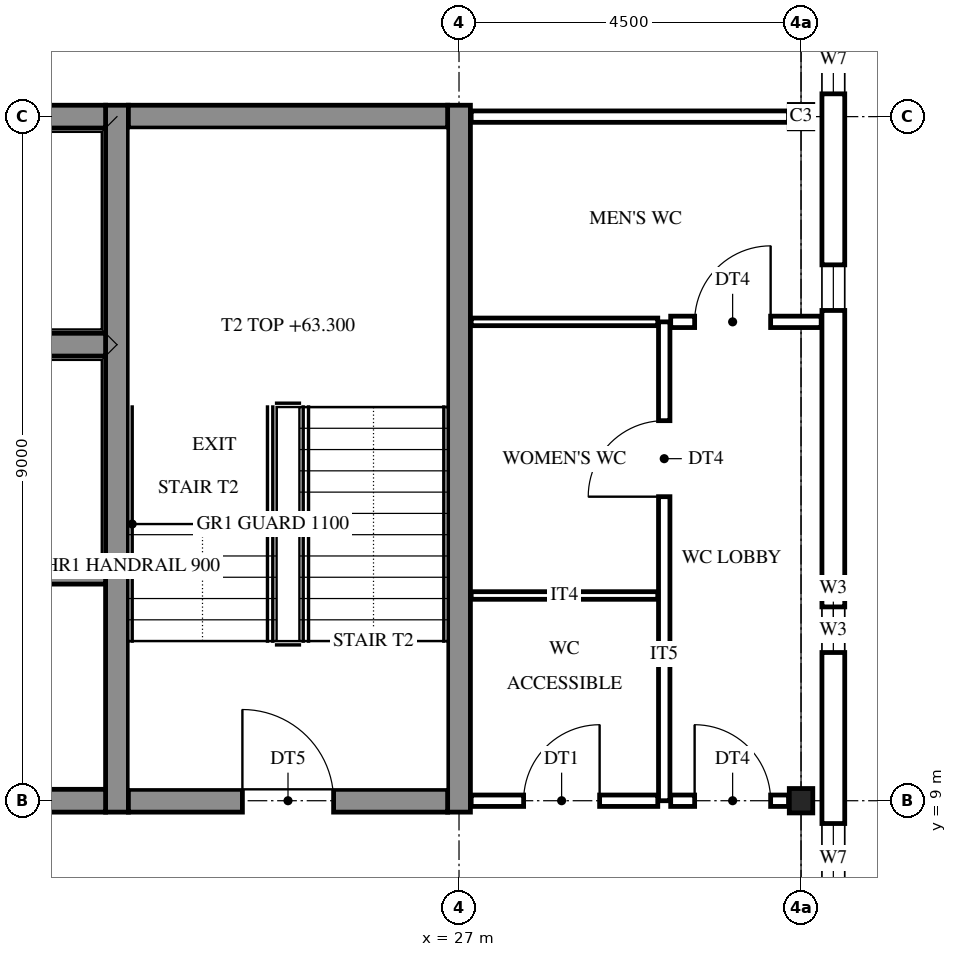
"""IFC4 building model, lengths in metres.
Left out: names, types, materials, properties, quantities, classifications, styles, units other than length and angle.
Written with IfcOpenShell. Run it as: python <this file> out.ifc"""

import sys

from ifc_helpers import new_model, si_unit, direction, frame, frame_2d, origin, origin_2d, place, context, subcontext, project, spatial, rectangle, i_section, extrude, element, fill, save


model = new_model("IFC4")
c1 = context("Model", 3, precision=1e-05, world=origin(), true_north=direction((0.0, 1.0)))
c2 = subcontext(c1, "Body", "Model", "MODEL_VIEW")
j1 = project(units=[si_unit("LENGTHUNIT", "METRE"), si_unit("PLANEANGLEUNIT", "RADIAN")], contexts=[c1])
p1 = place(None, origin())
s1 = spatial("IfcSite", under=j1, at=p1, CompositionType="ELEMENT")
p2 = place(p1, origin())
s2 = spatial("IfcBuilding", under=s1, at=p2, CompositionType="ELEMENT")
p3 = place(p2, frame((0.0, 0.0, 61.2)))
s3 = spatial("IfcBuildingStorey", under=s2, at=p3, CompositionType="ELEMENT", Elevation=61.2)
for number, where, z_axis, x_axis in (
    (1, (31.5, 9.0, 0.0), (0.0, 0.0, 1.0), (1.0, 0.0, 0.0)),
    (2, (31.5, 18.0, 0.0), (0.0, 0.0, 1.0), (1.0, 0.0, 0.0)),
):
    element("IfcColumn", number, at=place(p3, frame(where, z_axis=z_axis, x_axis=x_axis)), inside=s3, PredefinedType="COLUMN", context=c2, shape_type="SweptSolid", body=[
        extrude(i_section(OverallWidth=0.309, OverallDepth=0.321, WebThickness=0.014, FlangeThickness=0.022, FilletRadius=0.017, at=origin_2d()), origin(), (0.0, 0.0, 1.0), 4.2),
    ])
for number, where, z_axis, x_axis in (
    (3, (22.5, 8.85, 0.0), (0.0, 0.0, 1.0), (0.0, 1.0, 0.0)),
    (4, (27.0, 8.85, 0.0), (0.0, 0.0, 1.0), (0.0, 1.0, 0.0)),
):
    element("IfcWall", number, at=place(p3, frame(where, z_axis=z_axis, x_axis=x_axis)), inside=s3, PredefinedType="SHEAR", context=c2, shape_type="SweptSolid", body=[
        extrude(rectangle(XDim=9.3, YDim=0.3, at=frame_2d((4.65, 0.0))), origin(), (0.0, 0.0, 1.0), 4.2),
    ])
p4 = place(p3, frame((19.65, 9.0, 0.0), z_axis=(0.0, 0.0, 1.0), x_axis=(1.0, 0.0, 0.0)))
e5 = element("IfcWall", 5, at=p4, inside=s3, PredefinedType="SHEAR", context=c2, shape_type="SweptSolid", body=[
    extrude(rectangle(XDim=2.7, YDim=0.3, at=frame_2d((1.35, 0.0))), origin(), (0.0, 0.0, 1.0), 4.2),
])
p5 = place(p3, frame((22.65, 9.0, 0.0), z_axis=(0.0, 0.0, 1.0), x_axis=(1.0, 0.0, 0.0)))
e6 = element("IfcWall", 6, at=p5, inside=s3, PredefinedType="SHEAR", context=c2, shape_type="SweptSolid", body=[
    extrude(rectangle(XDim=4.2, YDim=0.3, at=frame_2d((2.1, 0.0))), origin(), (0.0, 0.0, 1.0), 4.2),
])
p6 = place(p5, frame((1.5, 0.0, 0.0)))
e7 = element("IfcOpeningElement", 7, at=p6, cuts=e6, PredefinedType="OPENING", context=c2, shape_type="SweptSolid", body=[
    extrude(rectangle(XDim=1.2, YDim=2.1, at=frame_2d((0.6, 1.05))), frame((0.0, 0.16, 0.0), z_axis=(0.0, -1.0, 0.0), x_axis=(1.0, 0.0, 0.0)), (0.0, 0.0, 1.0), 0.32),
])
for number, where, z_axis, x_axis in (
    (8, (19.65, 12.0, 0.0), (0.0, 0.0, 1.0), (1.0, 0.0, 0.0)),
    (9, (19.65, 15.0, 0.0), (0.0, 0.0, 1.0), (1.0, 0.0, 0.0)),
    (10, (19.65, 18.0, 0.0), (0.0, 0.0, 1.0), (1.0, 0.0, 0.0)),
):
    element("IfcWall", number, at=place(p3, frame(where, z_axis=z_axis, x_axis=x_axis)), inside=s3, PredefinedType="SHEAR", context=c2, shape_type="SweptSolid", body=[
        extrude(rectangle(XDim=2.7, YDim=0.3, at=frame_2d((1.35, 0.0))), origin(), (0.0, 0.0, 1.0), 4.2),
    ])
p7 = place(p3, frame((22.65, 18.0, 0.0), z_axis=(0.0, 0.0, 1.0), x_axis=(1.0, 0.0, 0.0)))
e11 = element("IfcWall", 11, at=p7, inside=s3, PredefinedType="SHEAR", context=c2, shape_type="SweptSolid", body=[
    extrude(rectangle(XDim=4.2, YDim=0.3, at=frame_2d((2.1, 0.0))), origin(), (0.0, 0.0, 1.0), 4.2),
])
p8 = place(p3, frame((31.925, 27.275, 0.0), z_axis=(0.0, 0.0, 1.0), x_axis=(0.0, -1.0, 0.0)))
e12 = element("IfcWall", 12, at=p8, inside=s3, PredefinedType="STANDARD", context=c2, shape_type="SweptSolid", body=[
    extrude(rectangle(XDim=27.55, YDim=0.3, at=frame_2d((13.775, 0.0))), origin(), (0.0, 0.0, 1.0), 4.2),
])
p9 = place(p8, frame((26.075, 0.0, 0.6)))
e13 = element("IfcOpeningElement", 13, at=p9, cuts=e12, PredefinedType="OPENING", context=c2, shape_type="SweptSolid", body=[
    extrude(rectangle(XDim=0.9, YDim=2.3, at=frame_2d((0.45, 1.15))), frame((0.0, 0.16, 0.0), z_axis=(0.0, -1.0, 0.0), x_axis=(1.0, 0.0, 0.0)), (0.0, 0.0, 1.0), 0.32),
])
p10 = place(p8, frame((18.575, 0.0, 0.6)))
e14 = element("IfcOpeningElement", 14, at=p10, cuts=e12, PredefinedType="OPENING", context=c2, shape_type="SweptSolid", body=[
    extrude(rectangle(XDim=0.9, YDim=2.3, at=frame_2d((0.45, 1.15))), frame((0.0, 0.16, 0.0), z_axis=(0.0, -1.0, 0.0), x_axis=(1.0, 0.0, 0.0)), (0.0, 0.0, 1.0), 0.32),
])
p11 = place(p8, frame((15.725, 0.0, 1.6)))
e15 = element("IfcOpeningElement", 15, at=p11, cuts=e12, PredefinedType="OPENING", context=c2, shape_type="SweptSolid", body=[
    extrude(rectangle(XDim=0.6, YDim=0.9, at=frame_2d((0.3, 0.45))), frame((0.0, 0.16, 0.0), z_axis=(0.0, -1.0, 0.0), x_axis=(1.0, 0.0, 0.0)), (0.0, 0.0, 1.0), 0.32),
])
p12 = place(p8, frame((11.225, 0.0, 1.6)))
e16 = element("IfcOpeningElement", 16, at=p12, cuts=e12, PredefinedType="OPENING", context=c2, shape_type="SweptSolid", body=[
    extrude(rectangle(XDim=0.6, YDim=0.9, at=frame_2d((0.3, 0.45))), frame((0.0, 0.16, 0.0), z_axis=(0.0, -1.0, 0.0), x_axis=(1.0, 0.0, 0.0)), (0.0, 0.0, 1.0), 0.32),
])
p13 = place(p8, frame((8.075, 0.0, 0.6)))
e17 = element("IfcOpeningElement", 17, at=p13, cuts=e12, PredefinedType="OPENING", context=c2, shape_type="SweptSolid", body=[
    extrude(rectangle(XDim=0.9, YDim=2.3, at=frame_2d((0.45, 1.15))), frame((0.0, 0.16, 0.0), z_axis=(0.0, -1.0, 0.0), x_axis=(1.0, 0.0, 0.0)), (0.0, 0.0, 1.0), 0.32),
])
p14 = place(p8, frame((0.575, 0.0, 0.6)))
e18 = element("IfcOpeningElement", 18, at=p14, cuts=e12, PredefinedType="OPENING", context=c2, shape_type="SweptSolid", body=[
    extrude(rectangle(XDim=0.9, YDim=2.3, at=frame_2d((0.45, 1.15))), frame((0.0, 0.16, 0.0), z_axis=(0.0, -1.0, 0.0), x_axis=(1.0, 0.0, 0.0)), (0.0, 0.0, 1.0), 0.32),
])
p15 = place(p3, frame((29.7, 9.0, 0.0), z_axis=(0.0, 0.0, 1.0), x_axis=(0.0, 1.0, 0.0)))
e19 = element("IfcWall", 19, at=p15, inside=s3, PredefinedType="PARTITIONING", context=c2, shape_type="SweptSolid", body=[
    extrude(rectangle(XDim=6.3, YDim=0.15, at=frame_2d((3.15, 0.0))), origin(), (0.0, 0.0, 1.0), 3.537),
])
p16 = place(p15, frame((4.0, 0.0, 0.0)))
e20 = element("IfcOpeningElement", 20, at=p16, cuts=e19, PredefinedType="OPENING", context=c2, shape_type="SweptSolid", body=[
    extrude(rectangle(XDim=1.0, YDim=2.1, at=frame_2d((0.5, 1.05))), frame((0.0, 0.085, 0.0), z_axis=(0.0, -1.0, 0.0), x_axis=(1.0, 0.0, 0.0)), (0.0, 0.0, 1.0), 0.17),
])
p17 = place(p3, frame((27.16, 9.0, 0.0), z_axis=(0.0, 0.0, 1.0), x_axis=(1.0, 0.0, 0.0)))
e21 = element("IfcWall", 21, at=p17, inside=s3, PredefinedType="PARTITIONING", context=c2, shape_type="SweptSolid", body=[
    extrude(rectangle(XDim=2.455, YDim=0.15, at=frame_2d((1.228, 0.0))), origin(), (0.0, 0.0, 1.0), 3.537),
])
p18 = place(p17, frame((0.69, 0.0, 0.0)))
e22 = element("IfcOpeningElement", 22, at=p18, cuts=e21, PredefinedType="OPENING", context=c2, shape_type="SweptSolid", body=[
    extrude(rectangle(XDim=1.0, YDim=2.1, at=frame_2d((0.5, 1.05))), frame((0.0, 0.085, 0.0), z_axis=(0.0, -1.0, 0.0), x_axis=(1.0, 0.0, 0.0)), (0.0, 0.0, 1.0), 0.17),
])
p19 = place(p3, frame((29.785, 9.0, 0.0), z_axis=(0.0, 0.0, 1.0), x_axis=(1.0, 0.0, 0.0)))
e23 = element("IfcWall", 23, at=p19, inside=s3, PredefinedType="PARTITIONING", context=c2, shape_type="SweptSolid", body=[
    extrude(rectangle(XDim=1.551, YDim=0.15, at=frame_2d((0.775, 0.0))), origin(), (0.0, 0.0, 1.0), 3.537),
])
p20 = place(p19, frame((0.315, 0.0, 0.0)))
e24 = element("IfcOpeningElement", 24, at=p20, cuts=e23, PredefinedType="OPENING", context=c2, shape_type="SweptSolid", body=[
    extrude(rectangle(XDim=1.0, YDim=2.1, at=frame_2d((0.5, 1.05))), frame((0.0, 0.085, 0.0), z_axis=(0.0, -1.0, 0.0), x_axis=(1.0, 0.0, 0.0)), (0.0, 0.0, 1.0), 0.17),
])
for number, where, z_axis, x_axis in (
    (25, (27.16, 11.7, 0.0), (0.0, 0.0, 1.0), (1.0, 0.0, 0.0)),
    (26, (27.16, 15.3, 0.0), (0.0, 0.0, 1.0), (1.0, 0.0, 0.0)),
):
    element("IfcWall", number, at=place(p3, frame(where, z_axis=z_axis, x_axis=x_axis)), inside=s3, PredefinedType="PARTITIONING", context=c2, shape_type="SweptSolid", body=[
        extrude(rectangle(XDim=2.455, YDim=0.1, at=frame_2d((1.228, 0.0))), origin(), (0.0, 0.0, 1.0), 3.537),
    ])
p21 = place(p3, frame((29.785, 15.3, 0.0), z_axis=(0.0, 0.0, 1.0), x_axis=(1.0, 0.0, 0.0)))
e27 = element("IfcWall", 27, at=p21, inside=s3, PredefinedType="PARTITIONING", context=c2, shape_type="SweptSolid", body=[
    extrude(rectangle(XDim=1.98, YDim=0.15, at=frame_2d((0.99, 0.0))), origin(), (0.0, 0.0, 1.0), 3.537),
])
p22 = place(p21, frame((0.315, 0.0, 0.0)))
e28 = element("IfcOpeningElement", 28, at=p22, cuts=e27, PredefinedType="OPENING", context=c2, shape_type="SweptSolid", body=[
    extrude(rectangle(XDim=1.0, YDim=2.1, at=frame_2d((0.5, 1.05))), frame((0.0, 0.085, 0.0), z_axis=(0.0, -1.0, 0.0), x_axis=(1.0, 0.0, 0.0)), (0.0, 0.0, 1.0), 0.17),
])
p23 = place(p3, frame((27.16, 18.0, 0.0), z_axis=(0.0, 0.0, 1.0), x_axis=(1.0, 0.0, 0.0)))
e29 = element("IfcWall", 29, at=p23, inside=s3, PredefinedType="PARTITIONING", context=c2, shape_type="SweptSolid", body=[
    extrude(rectangle(XDim=4.176, YDim=0.15, at=frame_2d((2.088, 0.0))), origin(), (0.0, 0.0, 1.0), 3.537),
])
p24 = place(p10, origin())
e30 = element("IfcWindow", 30, at=p24, inside=s3, PartitioningType="SINGLE_PANEL", PredefinedType="WINDOW", context=c2, shape_type="SweptSolid", body=[
    extrude(rectangle(XDim=0.9, YDim=2.3, at=frame_2d((0.45, 1.15))), frame((0.0, 0.03, 0.0), z_axis=(0.0, -1.0, 0.0), x_axis=(1.0, 0.0, 0.0)), (0.0, 0.0, 1.0), 0.06),
])
fill(e14, e30)
p25 = place(p11, origin())
e31 = element("IfcWindow", 31, at=p25, inside=s3, PartitioningType="SINGLE_PANEL", PredefinedType="WINDOW", context=c2, shape_type="SweptSolid", body=[
    extrude(rectangle(XDim=0.6, YDim=0.9, at=frame_2d((0.3, 0.45))), frame((0.0, 0.03, 0.0), z_axis=(0.0, -1.0, 0.0), x_axis=(1.0, 0.0, 0.0)), (0.0, 0.0, 1.0), 0.06),
])
fill(e15, e31)
p26 = place(p12, origin())
e32 = element("IfcWindow", 32, at=p26, inside=s3, PartitioningType="SINGLE_PANEL", PredefinedType="WINDOW", context=c2, shape_type="SweptSolid", body=[
    extrude(rectangle(XDim=0.6, YDim=0.9, at=frame_2d((0.3, 0.45))), frame((0.0, 0.03, 0.0), z_axis=(0.0, -1.0, 0.0), x_axis=(1.0, 0.0, 0.0)), (0.0, 0.0, 1.0), 0.06),
])
fill(e16, e32)
p27 = place(p13, origin())
e33 = element("IfcWindow", 33, at=p27, inside=s3, PartitioningType="SINGLE_PANEL", PredefinedType="WINDOW", context=c2, shape_type="SweptSolid", body=[
    extrude(rectangle(XDim=0.9, YDim=2.3, at=frame_2d((0.45, 1.15))), frame((0.0, 0.03, 0.0), z_axis=(0.0, -1.0, 0.0), x_axis=(1.0, 0.0, 0.0)), (0.0, 0.0, 1.0), 0.06),
])
fill(e17, e33)
p28 = place(p6, origin())
e34 = element("IfcDoor", 34, at=p28, inside=s3, OperationType="SINGLE_SWING_LEFT", PredefinedType="DOOR", context=c2, shape_type="SweptSolid", body=[
    extrude(rectangle(XDim=1.2, YDim=2.1, at=frame_2d((0.6, 1.05))), frame((0.0, 0.025, 0.0), z_axis=(0.0, -1.0, 0.0), x_axis=(1.0, 0.0, 0.0)), (0.0, 0.0, 1.0), 0.05),
])
fill(e7, e34)
p29 = place(p18, origin())
e35 = element("IfcDoor", 35, at=p29, inside=s3, OperationType="SINGLE_SWING_RIGHT", PredefinedType="DOOR", context=c2, shape_type="SweptSolid", body=[
    extrude(rectangle(XDim=1.0, YDim=2.1, at=frame_2d((0.5, 1.05))), frame((0.0, 0.025, 0.0), z_axis=(0.0, -1.0, 0.0), x_axis=(1.0, 0.0, 0.0)), (0.0, 0.0, 1.0), 0.05),
])
fill(e22, e35)
p30 = place(p16, origin())
e36 = element("IfcDoor", 36, at=p30, inside=s3, OperationType="SINGLE_SWING_LEFT", PredefinedType="DOOR", context=c2, shape_type="SweptSolid", body=[
    extrude(rectangle(XDim=1.0, YDim=2.1, at=frame_2d((0.5, 1.05))), frame((0.0, 0.025, 0.0), z_axis=(0.0, -1.0, 0.0), x_axis=(1.0, 0.0, 0.0)), (0.0, 0.0, 1.0), 0.05),
])
fill(e20, e36)
p31 = place(p22, origin())
e37 = element("IfcDoor", 37, at=p31, inside=s3, OperationType="SINGLE_SWING_RIGHT", PredefinedType="DOOR", context=c2, shape_type="SweptSolid", body=[
    extrude(rectangle(XDim=1.0, YDim=2.1, at=frame_2d((0.5, 1.05))), frame((0.0, 0.025, 0.0), z_axis=(0.0, -1.0, 0.0), x_axis=(1.0, 0.0, 0.0)), (0.0, 0.0, 1.0), 0.05),
])
fill(e28, e37)
p32 = place(p20, origin())
e38 = element("IfcDoor", 38, at=p32, inside=s3, OperationType="SINGLE_SWING_LEFT", PredefinedType="DOOR", context=c2, shape_type="SweptSolid", body=[
    extrude(rectangle(XDim=1.0, YDim=2.1, at=frame_2d((0.5, 1.05))), frame((0.0, 0.025, 0.0), z_axis=(0.0, -1.0, 0.0), x_axis=(1.0, 0.0, 0.0)), (0.0, 0.0, 1.0), 0.05),
])
fill(e24, e38)
save(model, sys.argv[1])
